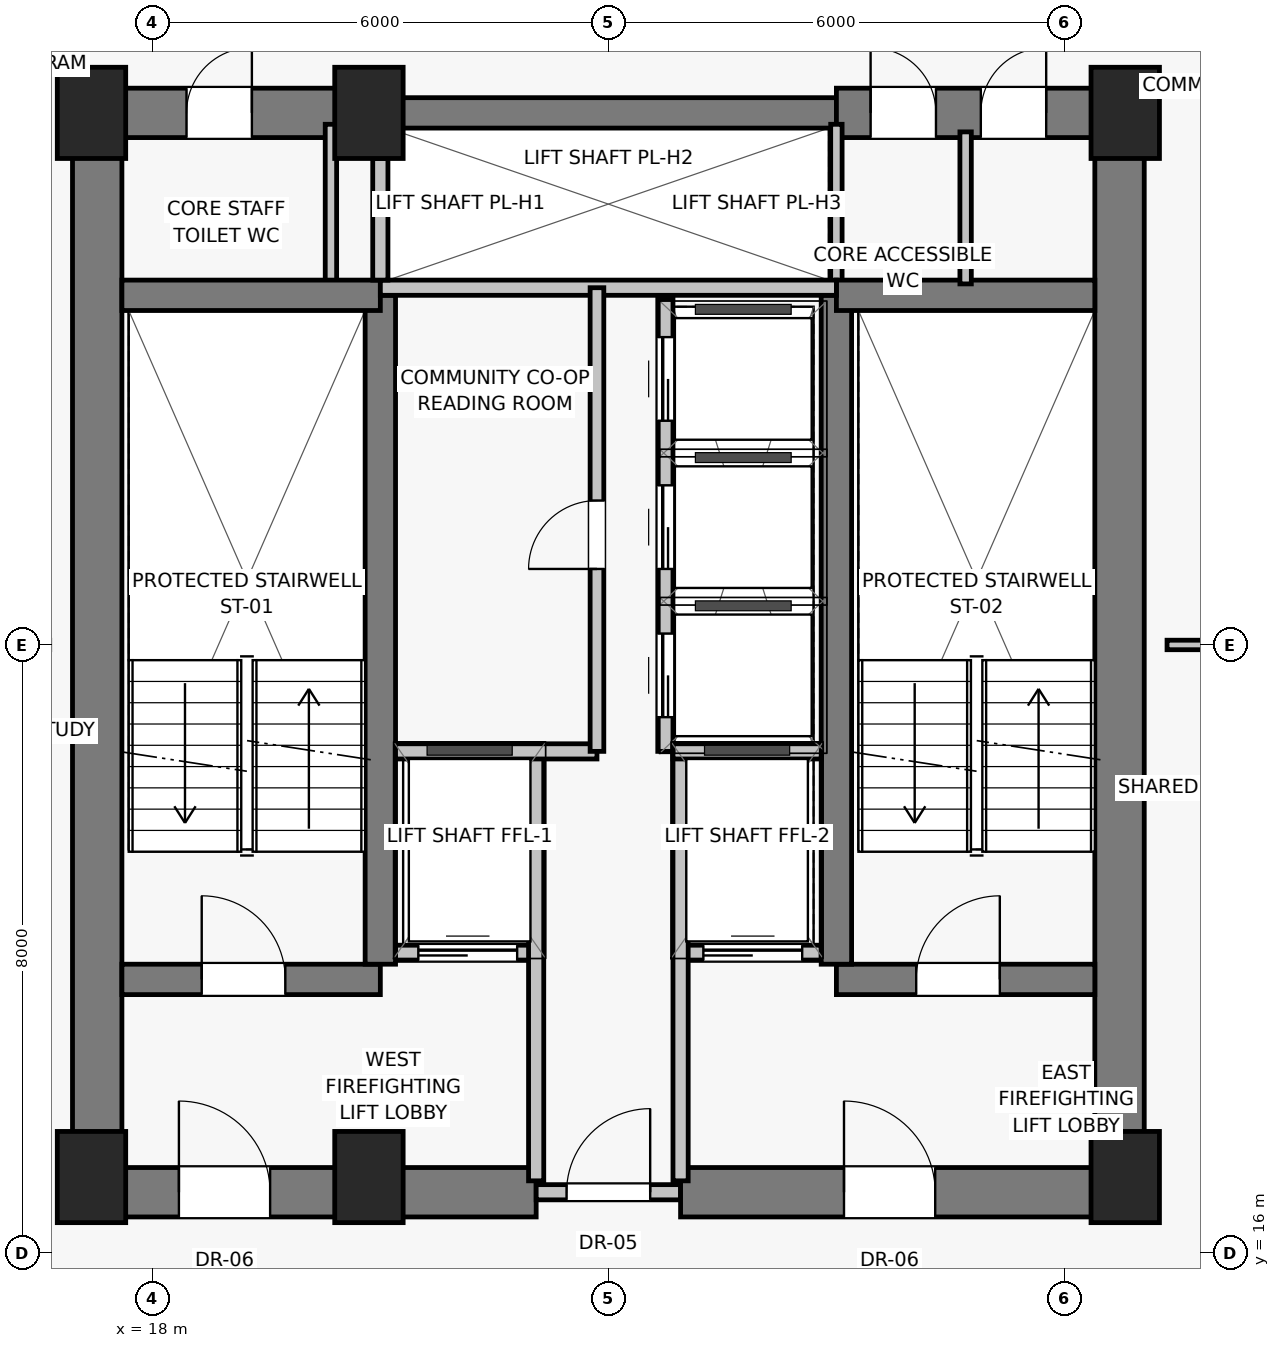
"""IFC4 building model, lengths in metres.
Left out: names, types, materials, properties, quantities, classifications, styles, units other than length and angle.
Written with IfcOpenShell. Run it as: python <this file> out.ifc"""

import sys

from ifc_helpers import new_model, si_unit, direction, frame, frame_2d, origin, origin_2d, place, context, subcontext, project, spatial, rectangle, extrude, source, transform, mapped, element, fill, save


model = new_model("IFC4")
c1 = context("Model", 3, precision=1e-05, world=origin(), true_north=direction((0.0, 1.0)))
c2 = subcontext(c1, "Body", "Model", "MODEL_VIEW")
j1 = project(units=[si_unit("LENGTHUNIT", "METRE"), si_unit("PLANEANGLEUNIT", "RADIAN")], contexts=[c1])
p1 = place(None, origin())
s1 = spatial("IfcSite", under=j1, at=p1, CompositionType="ELEMENT")
p2 = place(p1, origin())
s2 = spatial("IfcBuilding", under=s1, at=p2, CompositionType="ELEMENT")
p3 = place(p2, frame((0.0, 0.0, 99.2)))
s3 = spatial("IfcBuildingStorey", under=s2, at=p3, CompositionType="ELEMENT", Elevation=99.2)
for number, where, z_axis, x_axis in (
    (1, (17.2, 17.0, 0.0), (0.0, 0.0, 1.0), (1.0, 0.0, 0.0)),
    (2, (20.85, 17.0, 0.0), (0.0, 0.0, 1.0), (1.0, 0.0, 0.0)),
    (3, (30.8, 17.0, 0.0), (0.0, 0.0, 1.0), (1.0, 0.0, 0.0)),
    (4, (17.2, 31.0, 0.0), (0.0, 0.0, 1.0), (1.0, 0.0, 0.0)),
    (5, (20.85, 31.0, 0.0), (0.0, 0.0, 1.0), (1.0, 0.0, 0.0)),
    (6, (30.8, 31.0, 0.0), (0.0, 0.0, 1.0), (1.0, 0.0, 0.0)),
):
    element("IfcColumn", number, at=place(p3, frame(where, z_axis=z_axis, x_axis=x_axis)), inside=s3, PredefinedType="PILASTER", context=c2, shape_type="SweptSolid", body=[
        extrude(rectangle(XDim=0.9, YDim=1.2, at=origin_2d()), origin(), (0.0, 0.0, 1.0), 3.25),
    ])
for number, where, z_axis, x_axis in (
    (7, (17.275, 16.8, 0.0), (0.0, 0.0, 1.0), (0.0, 1.0, 0.0)),
    (8, (30.725, 16.8, 0.0), (0.0, 0.0, 1.0), (0.0, 1.0, 0.0)),
):
    element("IfcWall", number, at=place(p3, frame(where, z_axis=z_axis, x_axis=x_axis)), inside=s3, PredefinedType="SHEAR", context=c2, shape_type="SweptSolid", body=[
        extrude(rectangle(XDim=14.2, YDim=0.65, at=frame_2d((7.1, 0.0))), origin(), (0.0, 0.0, 1.0), 3.0),
    ])
p4 = place(p3, frame((17.2, 16.8, 0.0), z_axis=(0.0, 0.0, 1.0), x_axis=(1.0, 0.0, 0.0)))
e9 = element("IfcWall", 9, at=p4, inside=s3, PredefinedType="SHEAR", context=c2, shape_type="SweptSolid", body=[
    extrude(rectangle(XDim=5.85, YDim=0.65, at=frame_2d((2.925, 0.0))), origin(), (0.0, 0.0, 1.0), 3.0),
])
p5 = place(p4, frame((1.15, 0.0, 0.0)))
e10 = element("IfcOpeningElement", 10, at=p5, cuts=e9, PredefinedType="OPENING", context=c2, shape_type="SweptSolid", body=[
    extrude(rectangle(XDim=1.2, YDim=2.03, at=frame_2d((0.6, 1.015))), frame((0.0, 0.335, 0.0), z_axis=(0.0, -1.0, 0.0), x_axis=(1.0, 0.0, 0.0)), (0.0, 0.0, 1.0), 0.67),
])
p6 = place(p3, frame((23.05, 16.8, 0.0), z_axis=(0.0, 0.0, 1.0), x_axis=(1.0, 0.0, 0.0)))
e11 = element("IfcWall", 11, at=p6, inside=s3, PredefinedType="SOLIDWALL", context=c2, shape_type="SweptSolid", body=[
    extrude(rectangle(XDim=1.9, YDim=0.2, at=frame_2d((0.95, 0.0))), origin(), (0.0, 0.0, 1.0), 2.15),
])
p7 = place(p6, frame((0.4, 0.0, 0.0)))
e12 = element("IfcOpeningElement", 12, at=p7, cuts=e11, PredefinedType="OPENING", context=c2, shape_type="SweptSolid", body=[
    extrude(rectangle(XDim=1.1, YDim=2.03, at=frame_2d((0.55, 1.015))), frame((0.0, 0.11, 0.0), z_axis=(0.0, -1.0, 0.0), x_axis=(1.0, 0.0, 0.0)), (0.0, 0.0, 1.0), 0.22),
])
p8 = place(p3, frame((24.95, 16.8, 0.0), z_axis=(0.0, 0.0, 1.0), x_axis=(1.0, 0.0, 0.0)))
e13 = element("IfcWall", 13, at=p8, inside=s3, PredefinedType="SHEAR", context=c2, shape_type="SweptSolid", body=[
    extrude(rectangle(XDim=5.85, YDim=0.65, at=frame_2d((2.925, 0.0))), origin(), (0.0, 0.0, 1.0), 3.0),
])
p9 = place(p8, frame((2.15, 0.0, 0.0)))
e14 = element("IfcOpeningElement", 14, at=p9, cuts=e13, PredefinedType="OPENING", context=c2, shape_type="SweptSolid", body=[
    extrude(rectangle(XDim=1.2, YDim=2.03, at=frame_2d((0.6, 1.015))), frame((0.0, 0.335, 0.0), z_axis=(0.0, -1.0, 0.0), x_axis=(1.0, 0.0, 0.0)), (0.0, 0.0, 1.0), 0.67),
])
p10 = place(p3, frame((17.2, 31.0, 0.0), z_axis=(0.0, 0.0, 1.0), x_axis=(1.0, 0.0, 0.0)))
e15 = element("IfcWall", 15, at=p10, inside=s3, PredefinedType="SHEAR", context=c2, shape_type="SweptSolid", body=[
    extrude(rectangle(XDim=3.8, YDim=0.65, at=frame_2d((1.9, 0.0))), origin(), (0.0, 0.0, 1.0), 3.0),
])
p11 = place(p10, frame((1.25, 0.0, 0.0)))
e16 = element("IfcOpeningElement", 16, at=p11, cuts=e15, PredefinedType="OPENING", context=c2, shape_type="SweptSolid", body=[
    extrude(rectangle(XDim=0.86, YDim=2.01, at=frame_2d((0.43, 1.005))), frame((0.0, 0.335, 0.0), z_axis=(0.0, -1.0, 0.0), x_axis=(1.0, 0.0, 0.0)), (0.0, 0.0, 1.0), 0.67),
])
p12 = place(p3, frame((21.0, 31.0, 0.0), z_axis=(0.0, 0.0, 1.0), x_axis=(1.0, 0.0, 0.0)))
e17 = element("IfcWall", 17, at=p12, inside=s3, PredefinedType="SHEAR", context=c2, shape_type="SweptSolid", body=[
    extrude(rectangle(XDim=6.0, YDim=0.4, at=frame_2d((3.0, 0.0))), origin(), (0.0, 0.0, 1.0), 3.0),
])
p13 = place(p3, frame((27.0, 31.0, 0.0), z_axis=(0.0, 0.0, 1.0), x_axis=(1.0, 0.0, 0.0)))
e18 = element("IfcWall", 18, at=p13, inside=s3, PredefinedType="SHEAR", context=c2, shape_type="SweptSolid", body=[
    extrude(rectangle(XDim=3.8, YDim=0.65, at=frame_2d((1.9, 0.0))), origin(), (0.0, 0.0, 1.0), 3.0),
])
p14 = place(p13, frame((0.45, 0.0, 0.0)))
e19 = element("IfcOpeningElement", 19, at=p14, cuts=e18, PredefinedType="OPENING", context=c2, shape_type="SweptSolid", body=[
    extrude(rectangle(XDim=0.86, YDim=2.01, at=frame_2d((0.43, 1.005))), frame((0.0, 0.335, 0.0), z_axis=(0.0, -1.0, 0.0), x_axis=(1.0, 0.0, 0.0)), (0.0, 0.0, 1.0), 0.67),
])
p15 = place(p13, frame((1.9, 0.0, 0.0)))
e20 = element("IfcOpeningElement", 20, at=p15, cuts=e18, PredefinedType="OPENING", context=c2, shape_type="SweptSolid", body=[
    extrude(rectangle(XDim=0.86, YDim=2.01, at=frame_2d((0.43, 1.005))), frame((0.0, 0.335, 0.0), z_axis=(0.0, -1.0, 0.0), x_axis=(1.0, 0.0, 0.0)), (0.0, 0.0, 1.0), 0.67),
])
for number, where, z_axis, x_axis in (
    (21, (20.35, 28.65, 0.0), (0.0, 0.0, 1.0), (0.0, 1.0, 0.0)),
    (22, (27.0, 28.65, 0.0), (0.0, 0.0, 1.0), (0.0, 1.0, 0.0)),
):
    element("IfcWall", number, at=place(p3, frame(where, z_axis=z_axis, x_axis=x_axis)), inside=s3, PredefinedType="PARTITIONING", context=c2, shape_type="SweptSolid", body=[
        extrude(rectangle(XDim=2.2, YDim=0.15, at=frame_2d((1.1, 0.0))), origin(), (0.0, 0.0, 1.0), 3.0),
    ])
p16 = place(p3, frame((17.6, 19.6, 0.0), z_axis=(0.0, 0.0, 1.0), x_axis=(1.0, 0.0, 0.0)))
e23 = element("IfcWall", 23, at=p16, inside=s3, PredefinedType="SHEAR", context=c2, shape_type="SweptSolid", body=[
    extrude(rectangle(XDim=3.4, YDim=0.4, at=frame_2d((1.7, 0.0))), origin(), (0.0, 0.0, 1.0), 3.0),
])
p17 = place(p16, frame((1.05, 0.0, 0.0)))
e24 = element("IfcOpeningElement", 24, at=p17, cuts=e23, PredefinedType="OPENING", context=c2, shape_type="SweptSolid", body=[
    extrude(rectangle(XDim=1.1, YDim=2.03, at=frame_2d((0.55, 1.015))), frame((0.0, 0.21, 0.0), z_axis=(0.0, -1.0, 0.0), x_axis=(1.0, 0.0, 0.0)), (0.0, 0.0, 1.0), 0.42),
])
p18 = place(p3, frame((21.2, 19.95, 0.0), z_axis=(0.0, 0.0, 1.0), x_axis=(1.0, 0.0, 0.0)))
e25 = element("IfcWall", 25, at=p18, inside=s3, PredefinedType="SOLIDWALL", context=c2, shape_type="SweptSolid", body=[
    extrude(rectangle(XDim=1.85, YDim=0.2, at=frame_2d((0.925, 0.0))), origin(), (0.0, 0.0, 1.0), 3.0),
])
p19 = place(p18, frame((0.3, 0.0, 0.0)))
e26 = element("IfcOpeningElement", 26, at=p19, cuts=e25, PredefinedType="OPENING", context=c2, shape_type="SweptSolid", body=[
    extrude(rectangle(XDim=1.3, YDim=2.25, at=frame_2d((0.65, 1.125))), frame((0.0, 0.11, 0.0), z_axis=(0.0, -1.0, 0.0), x_axis=(1.0, 0.0, 0.0)), (0.0, 0.0, 1.0), 0.22),
])
p20 = place(p3, frame((24.95, 19.95, 0.0), z_axis=(0.0, 0.0, 1.0), x_axis=(1.0, 0.0, 0.0)))
e27 = element("IfcWall", 27, at=p20, inside=s3, PredefinedType="SOLIDWALL", context=c2, shape_type="SweptSolid", body=[
    extrude(rectangle(XDim=1.85, YDim=0.2, at=frame_2d((0.925, 0.0))), origin(), (0.0, 0.0, 1.0), 3.0),
])
p21 = place(p20, frame((0.3, 0.0, 0.0)))
e28 = element("IfcOpeningElement", 28, at=p21, cuts=e27, PredefinedType="OPENING", context=c2, shape_type="SweptSolid", body=[
    extrude(rectangle(XDim=1.3, YDim=2.25, at=frame_2d((0.65, 1.125))), frame((0.0, 0.11, 0.0), z_axis=(0.0, -1.0, 0.0), x_axis=(1.0, 0.0, 0.0)), (0.0, 0.0, 1.0), 0.22),
])
p22 = place(p3, frame((27.0, 19.6, 0.0), z_axis=(0.0, 0.0, 1.0), x_axis=(1.0, 0.0, 0.0)))
e29 = element("IfcWall", 29, at=p22, inside=s3, PredefinedType="SHEAR", context=c2, shape_type="SweptSolid", body=[
    extrude(rectangle(XDim=3.4, YDim=0.4, at=frame_2d((1.7, 0.0))), origin(), (0.0, 0.0, 1.0), 3.0),
])
p23 = place(p22, frame((1.05, 0.0, 0.0)))
e30 = element("IfcOpeningElement", 30, at=p23, cuts=e29, PredefinedType="OPENING", context=c2, shape_type="SweptSolid", body=[
    extrude(rectangle(XDim=1.1, YDim=2.03, at=frame_2d((0.55, 1.015))), frame((0.0, 0.21, 0.0), z_axis=(0.0, -1.0, 0.0), x_axis=(1.0, 0.0, 0.0)), (0.0, 0.0, 1.0), 0.42),
])
for number, where, z_axis, x_axis in (
    (31, (21.0, 19.8, 0.0), (0.0, 0.0, 1.0), (0.0, 1.0, 0.0)),
    (32, (27.0, 19.8, 0.0), (0.0, 0.0, 1.0), (0.0, 1.0, 0.0)),
):
    element("IfcWall", number, at=place(p3, frame(where, z_axis=z_axis, x_axis=x_axis)), inside=s3, PredefinedType="SHEAR", context=c2, shape_type="SweptSolid", body=[
        extrude(rectangle(XDim=8.8, YDim=0.4, at=frame_2d((4.4, 0.0))), origin(), (0.0, 0.0, 1.0), 3.0),
    ])
for number, where, z_axis, x_axis in (
    (33, (17.6, 28.6, 0.0), (0.0, 0.0, 1.0), (1.0, 0.0, 0.0)),
    (34, (27.0, 28.6, 0.0), (0.0, 0.0, 1.0), (1.0, 0.0, 0.0)),
):
    element("IfcWall", number, at=place(p3, frame(where, z_axis=z_axis, x_axis=x_axis)), inside=s3, PredefinedType="SHEAR", context=c2, shape_type="SweptSolid", body=[
        extrude(rectangle(XDim=3.4, YDim=0.4, at=frame_2d((1.7, 0.0))), origin(), (0.0, 0.0, 1.0), 3.0),
    ])
for number, where, z_axis, x_axis in (
    (35, (23.05, 16.95, 0.0), (0.0, 0.0, 1.0), (0.0, 1.0, 0.0)),
    (36, (24.95, 16.95, 0.0), (0.0, 0.0, 1.0), (0.0, 1.0, 0.0)),
):
    element("IfcWall", number, at=place(p3, frame(where, z_axis=z_axis, x_axis=x_axis)), inside=s3, PredefinedType="SOLIDWALL", context=c2, shape_type="SweptSolid", body=[
        extrude(rectangle(XDim=5.6, YDim=0.2, at=frame_2d((2.8, 0.0))), origin(), (0.0, 0.0, 1.0), 3.0),
    ])
p24 = place(p3, frame((21.2, 22.6, 0.0), z_axis=(0.0, 0.0, 1.0), x_axis=(1.0, 0.0, 0.0)))
e37 = element("IfcWall", 37, at=p24, inside=s3, PredefinedType="SOLIDWALL", context=c2, shape_type="SweptSolid", body=[
    extrude(rectangle(XDim=2.65, YDim=0.2, at=frame_2d((1.325, 0.0))), origin(), (0.0, 0.0, 1.0), 3.0),
])
p25 = place(p3, frame((24.85, 22.6, 0.0), z_axis=(0.0, 0.0, 1.0), x_axis=(1.0, 0.0, 0.0)))
e38 = element("IfcWall", 38, at=p25, inside=s3, PredefinedType="SOLIDWALL", context=c2, shape_type="SweptSolid", body=[
    extrude(rectangle(XDim=1.95, YDim=0.2, at=frame_2d((0.975, 0.0))), origin(), (0.0, 0.0, 1.0), 3.0),
])
p26 = place(p3, frame((21.0, 28.7, 0.0), z_axis=(0.0, 0.0, 1.0), x_axis=(1.0, 0.0, 0.0)))
e39 = element("IfcWall", 39, at=p26, inside=s3, PredefinedType="SOLIDWALL", context=c2, shape_type="SweptSolid", body=[
    extrude(rectangle(XDim=6.0, YDim=0.2, at=frame_2d((3.0, 0.0))), origin(), (0.0, 0.0, 1.0), 3.0),
])
p27 = place(p3, frame((21.0, 28.8, 0.0), z_axis=(0.0, 0.0, 1.0), x_axis=(0.0, 1.0, 0.0)))
e40 = element("IfcWall", 40, at=p27, inside=s3, PredefinedType="SOLIDWALL", context=c2, shape_type="SweptSolid", body=[
    extrude(rectangle(XDim=1.6, YDim=0.2, at=frame_2d((0.8, 0.0))), origin(), (0.0, 0.0, 1.0), 3.0),
])
p28 = place(p3, frame((23.85, 22.6, 0.0), z_axis=(0.0, 0.0, 1.0), x_axis=(0.0, 1.0, 0.0)))
e41 = element("IfcWall", 41, at=p28, inside=s3, PredefinedType="PARTITIONING", context=c2, shape_type="SweptSolid", body=[
    extrude(rectangle(XDim=6.1, YDim=0.18, at=frame_2d((3.05, 0.0))), origin(), (0.0, 0.0, 1.0), 3.0),
])
p29 = place(p28, frame((2.4, 0.0, 0.0)))
e42 = element("IfcOpeningElement", 42, at=p29, cuts=e41, PredefinedType="OPENING", context=c2, shape_type="SweptSolid", body=[
    extrude(rectangle(XDim=0.9, YDim=2.01, at=frame_2d((0.45, 1.005))), frame((0.0, 0.1, 0.0), z_axis=(0.0, -1.0, 0.0), x_axis=(1.0, 0.0, 0.0)), (0.0, 0.0, 1.0), 0.2),
])
p30 = place(p3, frame((24.75, 22.6, 0.0), z_axis=(0.0, 0.0, 1.0), x_axis=(0.0, 1.0, 0.0)))
e43 = element("IfcWall", 43, at=p30, inside=s3, PredefinedType="SOLIDWALL", context=c2, shape_type="SweptSolid", body=[
    extrude(rectangle(XDim=5.95, YDim=0.2, at=frame_2d((2.975, 0.0))), origin(), (0.0, 0.0, 1.0), 3.0),
])
p31 = place(p30, frame((0.45, 0.0, 0.0)))
e44 = element("IfcOpeningElement", 44, at=p31, cuts=e43, PredefinedType="OPENING", context=c2, shape_type="SweptSolid", body=[
    extrude(rectangle(XDim=1.1, YDim=2.08, at=frame_2d((0.55, 1.04))), frame((0.0, 0.11, 0.0), z_axis=(0.0, -1.0, 0.0), x_axis=(1.0, 0.0, 0.0)), (0.0, 0.0, 1.0), 0.22),
])
p32 = place(p30, frame((2.4, 0.0, 0.0)))
e45 = element("IfcOpeningElement", 45, at=p32, cuts=e43, PredefinedType="OPENING", context=c2, shape_type="SweptSolid", body=[
    extrude(rectangle(XDim=1.1, YDim=2.08, at=frame_2d((0.55, 1.04))), frame((0.0, 0.11, 0.0), z_axis=(0.0, -1.0, 0.0), x_axis=(1.0, 0.0, 0.0)), (0.0, 0.0, 1.0), 0.22),
])
p33 = place(p30, frame((4.35, 0.0, 0.0)))
e46 = element("IfcOpeningElement", 46, at=p33, cuts=e43, PredefinedType="OPENING", context=c2, shape_type="SweptSolid", body=[
    extrude(rectangle(XDim=1.1, YDim=2.08, at=frame_2d((0.55, 1.04))), frame((0.0, 0.11, 0.0), z_axis=(0.0, -1.0, 0.0), x_axis=(1.0, 0.0, 0.0)), (0.0, 0.0, 1.0), 0.22),
])
p34 = place(p3, frame((28.7, 28.75, 0.0), z_axis=(0.0, 0.0, 1.0), x_axis=(0.0, 1.0, 0.0)))
e47 = element("IfcWall", 47, at=p34, inside=s3, PredefinedType="PARTITIONING", context=c2, shape_type="SweptSolid", body=[
    extrude(rectangle(XDim=2.0, YDim=0.15, at=frame_2d((1.0, 0.0))), origin(), (0.0, 0.0, 1.0), 3.0),
])
p35 = place(p3, frame((31.35, 24.0, 0.0), z_axis=(0.0, 0.0, 1.0), x_axis=(1.0, 0.0, 0.0)))
e48 = element("IfcWall", 48, at=p35, inside=s3, PredefinedType="PARTITIONING", context=c2, shape_type="SweptSolid", body=[
    extrude(rectangle(XDim=2.1, YDim=0.125, at=frame_2d((1.05, 0.0))), origin(), (0.0, 0.0, 1.0), 3.0),
])
m1 = source(origin(), c2, "Body", "SweptSolid", [
    extrude(rectangle(XDim=1.2, YDim=2.03, at=frame_2d((0.6, 1.015))), frame((0.0, 0.025, 0.0), z_axis=(0.0, -1.0, 0.0), x_axis=(1.0, 0.0, 0.0)), (0.0, 0.0, 1.0), 0.05),
])
p36 = place(p5, origin())
e49 = element("IfcDoor", 49, at=p36, inside=s3, OperationType="SINGLE_SWING_LEFT", PredefinedType="DOOR", context=c2, shape_type="MappedRepresentation", body=[
    mapped(m1, transform((0.0, 0.0, 0.0), scale=1.0)),
])
fill(e10, e49)
m2 = source(origin(), c2, "Body", "SweptSolid", [
    extrude(rectangle(XDim=1.1, YDim=2.03, at=frame_2d((0.55, 1.015))), frame((0.0, 0.025, 0.0), z_axis=(0.0, -1.0, 0.0), x_axis=(1.0, 0.0, 0.0)), (0.0, 0.0, 1.0), 0.05),
])
p37 = place(p7, origin())
e50 = element("IfcDoor", 50, at=p37, inside=s3, OperationType="SINGLE_SWING_RIGHT", PredefinedType="DOOR", context=c2, shape_type="MappedRepresentation", body=[
    mapped(m2, transform((0.0, 0.0, 0.0), scale=1.0)),
])
fill(e12, e50)
p38 = place(p9, origin())
e51 = element("IfcDoor", 51, at=p38, inside=s3, OperationType="SINGLE_SWING_LEFT", PredefinedType="DOOR", context=c2, shape_type="MappedRepresentation", body=[
    mapped(m1, transform((0.0, 0.0, 0.0), scale=1.0)),
])
fill(e14, e51)
m3 = source(origin(), c2, "Body", "SweptSolid", [
    extrude(rectangle(XDim=0.86, YDim=2.01, at=frame_2d((0.43, 1.005))), frame((0.0, 0.025, 0.0), z_axis=(0.0, -1.0, 0.0), x_axis=(1.0, 0.0, 0.0)), (0.0, 0.0, 1.0), 0.05),
])
p39 = place(p11, origin())
e52 = element("IfcDoor", 52, at=p39, inside=s3, OperationType="SINGLE_SWING_RIGHT", PredefinedType="DOOR", context=c2, shape_type="MappedRepresentation", body=[
    mapped(m3, transform((0.0, 0.0, 0.0), scale=1.0)),
])
fill(e16, e52)
p40 = place(p14, origin())
e53 = element("IfcDoor", 53, at=p40, inside=s3, OperationType="SINGLE_SWING_LEFT", PredefinedType="DOOR", context=c2, shape_type="MappedRepresentation", body=[
    mapped(m3, transform((0.0, 0.0, 0.0), scale=1.0)),
])
fill(e19, e53)
p41 = place(p15, origin())
e54 = element("IfcDoor", 54, at=p41, inside=s3, OperationType="SINGLE_SWING_RIGHT", PredefinedType="DOOR", context=c2, shape_type="MappedRepresentation", body=[
    mapped(m3, transform((0.0, 0.0, 0.0), scale=1.0)),
])
fill(e20, e54)
p42 = place(p17, origin())
e55 = element("IfcDoor", 55, at=p42, inside=s3, OperationType="SINGLE_SWING_LEFT", PredefinedType="DOOR", context=c2, shape_type="MappedRepresentation", body=[
    mapped(m2, transform((0.0, 0.0, 0.0), scale=1.0)),
])
fill(e24, e55)
m4 = source(origin(), c2, "Body", "SweptSolid", [
    extrude(rectangle(XDim=1.3, YDim=2.25, at=frame_2d((0.65, 1.125))), frame((0.0, 0.025, 0.0), z_axis=(0.0, -1.0, 0.0), x_axis=(1.0, 0.0, 0.0)), (0.0, 0.0, 1.0), 0.05),
])
p43 = place(p19, origin())
e56 = element("IfcDoor", 56, at=p43, inside=s3, OperationType="SLIDING_TO_LEFT", PredefinedType="DOOR", context=c2, shape_type="MappedRepresentation", body=[
    mapped(m4, transform((0.0, 0.0, 0.0), scale=1.0)),
])
fill(e26, e56)
p44 = place(p21, origin())
e57 = element("IfcDoor", 57, at=p44, inside=s3, OperationType="SLIDING_TO_LEFT", PredefinedType="DOOR", context=c2, shape_type="MappedRepresentation", body=[
    mapped(m4, transform((0.0, 0.0, 0.0), scale=1.0)),
])
fill(e28, e57)
p45 = place(p23, origin())
e58 = element("IfcDoor", 58, at=p45, inside=s3, OperationType="SINGLE_SWING_RIGHT", PredefinedType="DOOR", context=c2, shape_type="MappedRepresentation", body=[
    mapped(m2, transform((0.0, 0.0, 0.0), scale=1.0)),
])
fill(e30, e58)
m5 = source(origin(), c2, "Body", "SweptSolid", [
    extrude(rectangle(XDim=0.9, YDim=2.01, at=frame_2d((0.45, 1.005))), frame((0.0, 0.025, 0.0), z_axis=(0.0, -1.0, 0.0), x_axis=(1.0, 0.0, 0.0)), (0.0, 0.0, 1.0), 0.05),
])
p46 = place(p29, origin())
e59 = element("IfcDoor", 59, at=p46, inside=s3, OperationType="SINGLE_SWING_LEFT", PredefinedType="DOOR", context=c2, shape_type="MappedRepresentation", body=[
    mapped(m5, transform((0.0, 0.0, 0.0), scale=1.0)),
])
fill(e42, e59)
m6 = source(origin(), c2, "Body", "SweptSolid", [
    extrude(rectangle(XDim=1.1, YDim=2.08, at=frame_2d((0.55, 1.04))), frame((0.0, 0.025, 0.0), z_axis=(0.0, -1.0, 0.0), x_axis=(1.0, 0.0, 0.0)), (0.0, 0.0, 1.0), 0.05),
])
p47 = place(p31, origin())
e60 = element("IfcDoor", 60, at=p47, inside=s3, OperationType="SLIDING_TO_LEFT", PredefinedType="DOOR", context=c2, shape_type="MappedRepresentation", body=[
    mapped(m6, transform((0.0, 0.0, 0.0), scale=1.0)),
])
fill(e44, e60)
p48 = place(p32, origin())
e61 = element("IfcDoor", 61, at=p48, inside=s3, OperationType="SLIDING_TO_LEFT", PredefinedType="DOOR", context=c2, shape_type="MappedRepresentation", body=[
    mapped(m6, transform((0.0, 0.0, 0.0), scale=1.0)),
])
fill(e45, e61)
p49 = place(p33, origin())
e62 = element("IfcDoor", 62, at=p49, inside=s3, OperationType="SLIDING_TO_LEFT", PredefinedType="DOOR", context=c2, shape_type="MappedRepresentation", body=[
    mapped(m6, transform((0.0, 0.0, 0.0), scale=1.0)),
])
fill(e46, e62)
save(model, sys.argv[1])
